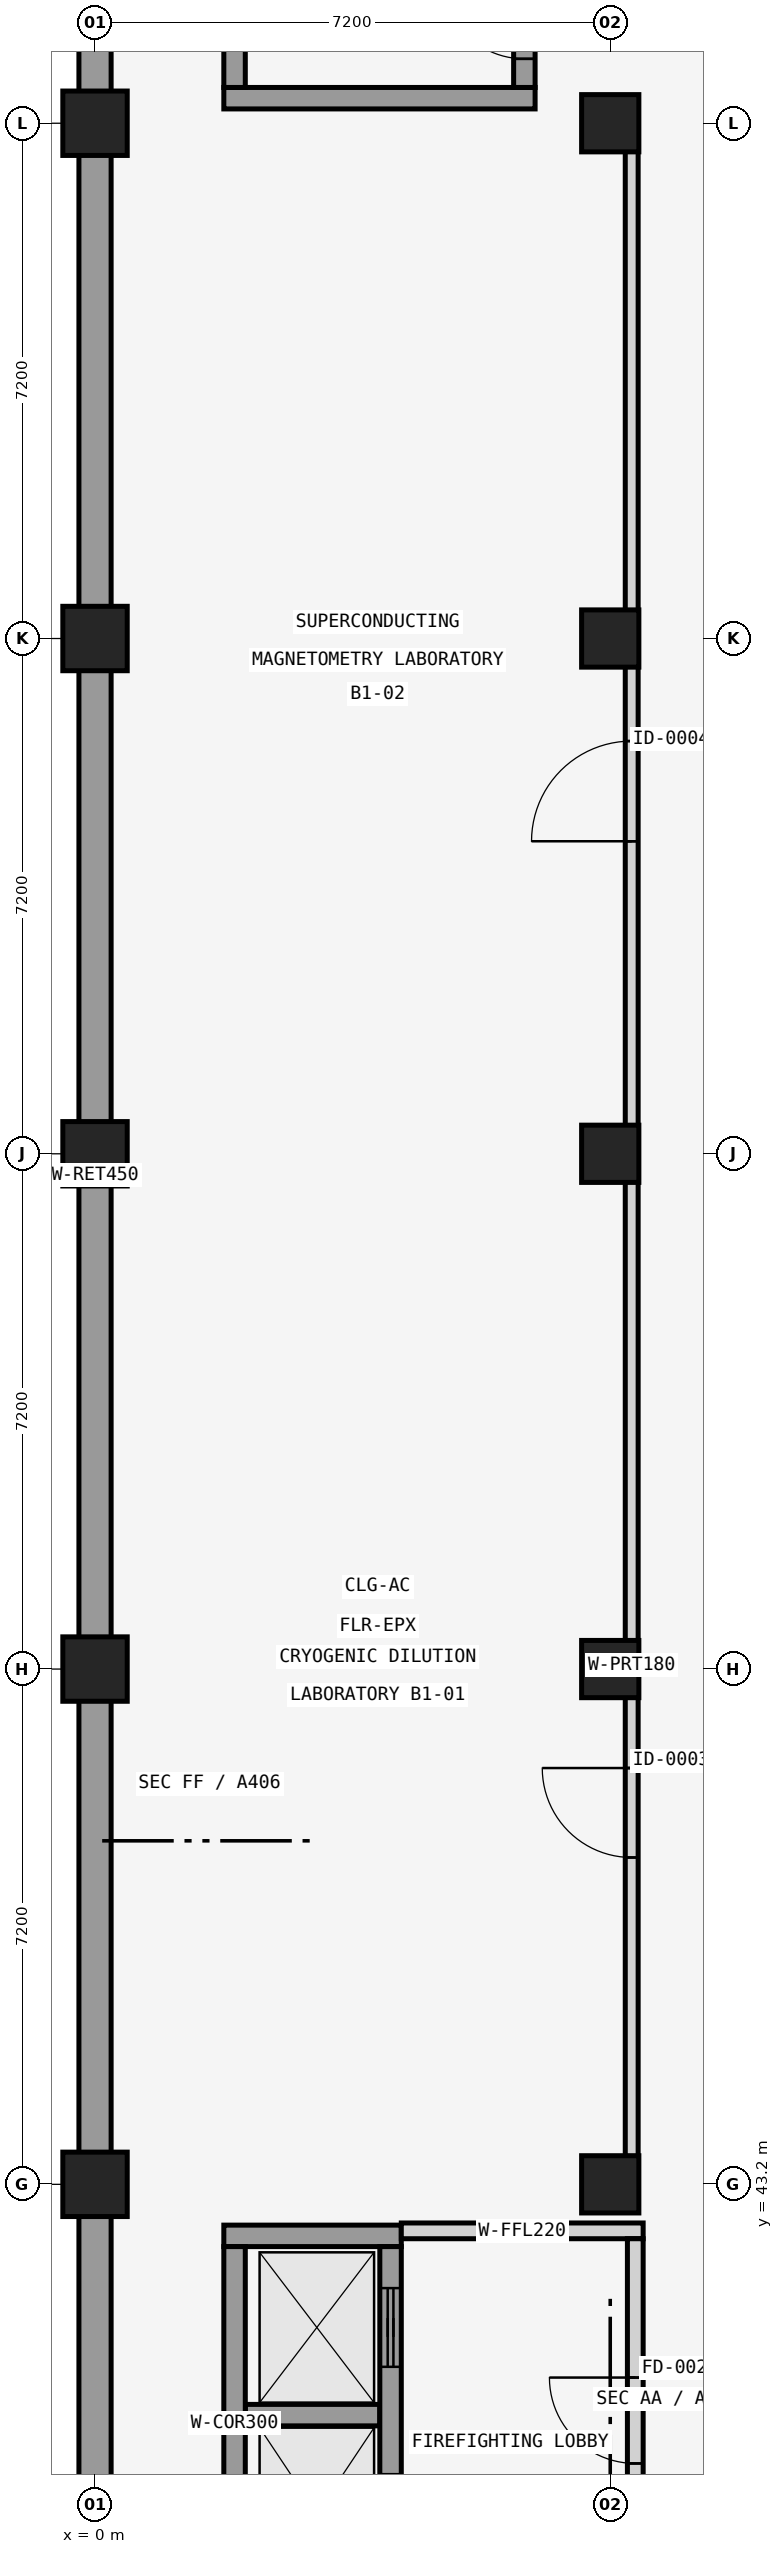
"""IFC4 building model, lengths in metres.
Left out: names, types, materials, properties, quantities, classifications, styles, units other than length and angle.
Written with IfcOpenShell. Run it as: python <this file> out.ifc"""

import sys

from ifc_helpers import new_model, si_unit, direction, frame, frame_2d, origin, origin_2d, place, context, subcontext, project, spatial, rectangle, extrude, element, fill, save


model = new_model("IFC4")
c1 = context("Model", 3, precision=1e-05, world=origin(), true_north=direction((0.0, 1.0)))
c2 = subcontext(c1, "Body", "Model", "MODEL_VIEW")
j1 = project(units=[si_unit("LENGTHUNIT", "METRE"), si_unit("PLANEANGLEUNIT", "RADIAN")], contexts=[c1])
p1 = place(None, origin())
s1 = spatial("IfcSite", under=j1, at=p1, CompositionType="ELEMENT")
p2 = place(p1, origin())
s2 = spatial("IfcBuilding", under=s1, at=p2, CompositionType="ELEMENT")
p3 = place(p2, frame((0.0, 0.0, -4.8)))
s3 = spatial("IfcBuildingStorey", under=s2, at=p3, CompositionType="ELEMENT", Elevation=-4.8)
for number, where, z_axis, x_axis in (
    (1, (0.0, 43.2, 0.0), (0.0, 0.0, 1.0), (1.0, 0.0, 0.0)),
    (2, (0.0, 50.4, 0.0), (0.0, 0.0, 1.0), (1.0, 0.0, 0.0)),
    (3, (0.0, 57.6, 0.0), (0.0, 0.0, 1.0), (1.0, 0.0, 0.0)),
    (4, (0.0, 64.8, 0.0), (0.0, 0.0, 1.0), (1.0, 0.0, 0.0)),
    (5, (0.0, 72.0, 0.0), (0.0, 0.0, 1.0), (1.0, 0.0, 0.0)),
):
    element("IfcColumn", number, at=place(p3, frame(where, z_axis=z_axis, x_axis=x_axis)), inside=s3, PredefinedType="COLUMN", context=c2, shape_type="SweptSolid", body=[
        extrude(rectangle(XDim=0.9, YDim=0.9, at=origin_2d()), origin(), (0.0, 0.0, 1.0), 4.8),
    ])
for number, where, z_axis, x_axis in (
    (6, (7.2, 43.2, 0.0), (0.0, 0.0, 1.0), (1.0, 0.0, 0.0)),
    (7, (7.2, 50.4, 0.0), (0.0, 0.0, 1.0), (1.0, 0.0, 0.0)),
    (8, (7.2, 57.6, 0.0), (0.0, 0.0, 1.0), (1.0, 0.0, 0.0)),
    (9, (7.2, 64.8, 0.0), (0.0, 0.0, 1.0), (1.0, 0.0, 0.0)),
    (10, (7.2, 72.0, 0.0), (0.0, 0.0, 1.0), (1.0, 0.0, 0.0)),
):
    element("IfcColumn", number, at=place(p3, frame(where, z_axis=z_axis, x_axis=x_axis)), inside=s3, PredefinedType="COLUMN", context=c2, shape_type="SweptSolid", body=[
        extrude(rectangle(XDim=0.8, YDim=0.8, at=origin_2d()), origin(), (0.0, 0.0, 1.0), 4.8),
    ])
p4 = place(p3, frame((0.0, 21.0, 0.0), z_axis=(0.0, 0.0, 1.0), x_axis=(0.0, 1.0, 0.0)))
e11 = element("IfcWall", 11, at=p4, inside=s3, PredefinedType="STANDARD", context=c2, shape_type="SweptSolid", body=[
    extrude(rectangle(XDim=72.6, YDim=0.45, at=frame_2d((36.3, 0.0))), origin(), (0.0, 0.0, 1.0), 4.4),
])
p5 = place(p3, frame((1.8, 42.48, 0.0), z_axis=(0.0, 0.0, 1.0), x_axis=(1.0, 0.0, 0.0)))
e12 = element("IfcWall", 12, at=p5, inside=s3, PredefinedType="SHEAR", context=c2, shape_type="SweptSolid", body=[
    extrude(rectangle(XDim=2.48, YDim=0.3, at=frame_2d((1.24, 0.0))), origin(), (0.0, 0.0, 1.0), 4.4),
])
p6 = place(p3, frame((2.1, 39.975, 0.0), z_axis=(0.0, 0.0, 1.0), x_axis=(1.0, 0.0, 0.0)))
e13 = element("IfcWall", 13, at=p6, inside=s3, PredefinedType="SHEAR", context=c2, shape_type="SweptSolid", body=[
    extrude(rectangle(XDim=1.88, YDim=0.3, at=frame_2d((0.94, 0.0))), origin(), (0.0, 0.0, 1.0), 4.4),
])
p7 = place(p3, frame((1.95, 37.4, 0.0), z_axis=(0.0, 0.0, 1.0), x_axis=(0.0, 1.0, 0.0)))
e14 = element("IfcWall", 14, at=p7, inside=s3, PredefinedType="SHEAR", context=c2, shape_type="SweptSolid", body=[
    extrude(rectangle(XDim=4.93, YDim=0.3, at=frame_2d((2.465, 0.0))), origin(), (0.0, 0.0, 1.0), 4.4),
])
p8 = place(p3, frame((4.13, 37.4, 0.0), z_axis=(0.0, 0.0, 1.0), x_axis=(0.0, 1.0, 0.0)))
e15 = element("IfcWall", 15, at=p8, inside=s3, PredefinedType="SHEAR", context=c2, shape_type="SweptSolid", body=[
    extrude(rectangle(XDim=4.93, YDim=0.3, at=frame_2d((2.465, 0.0))), origin(), (0.0, 0.0, 1.0), 4.4),
])
p9 = place(p8, frame((0.65, 0.0, 0.0)))
e16 = element("IfcOpeningElement", 16, at=p9, cuts=e15, PredefinedType="OPENING", context=c2, shape_type="SweptSolid", body=[
    extrude(rectangle(XDim=1.1, YDim=2.2, at=frame_2d((0.55, 1.1))), frame((0.0, 0.16, 0.0), z_axis=(0.0, -1.0, 0.0), x_axis=(1.0, 0.0, 0.0)), (0.0, 0.0, 1.0), 0.32),
])
p10 = place(p8, frame((3.25, 0.0, 0.0)))
e17 = element("IfcOpeningElement", 17, at=p10, cuts=e15, PredefinedType="OPENING", context=c2, shape_type="SweptSolid", body=[
    extrude(rectangle(XDim=1.1, YDim=2.2, at=frame_2d((0.55, 1.1))), frame((0.0, 0.16, 0.0), z_axis=(0.0, -1.0, 0.0), x_axis=(1.0, 0.0, 0.0)), (0.0, 0.0, 1.0), 0.32),
])
p11 = place(p3, frame((4.28, 42.55, 0.0), z_axis=(0.0, 0.0, 1.0), x_axis=(1.0, 0.0, 0.0)))
e18 = element("IfcWall", 18, at=p11, inside=s3, PredefinedType="SOLIDWALL", context=c2, shape_type="SweptSolid", body=[
    extrude(rectangle(XDim=3.38, YDim=0.22, at=frame_2d((1.69, 0.0))), origin(), (0.0, 0.0, 1.0), 4.4),
])
p12 = place(p3, frame((7.55, 37.36, 0.0), z_axis=(0.0, 0.0, 1.0), x_axis=(0.0, 1.0, 0.0)))
e19 = element("IfcWall", 19, at=p12, inside=s3, PredefinedType="SOLIDWALL", context=c2, shape_type="SweptSolid", body=[
    extrude(rectangle(XDim=5.08, YDim=0.22, at=frame_2d((2.54, 0.0))), origin(), (0.0, 0.0, 1.0), 4.4),
])
p13 = place(p12, frame((1.94, 0.0, 0.0)))
e20 = element("IfcOpeningElement", 20, at=p13, cuts=e19, PredefinedType="OPENING", context=c2, shape_type="SweptSolid", body=[
    extrude(rectangle(XDim=1.2, YDim=2.2, at=frame_2d((0.6, 1.1))), frame((0.0, 0.12, 0.0), z_axis=(0.0, -1.0, 0.0), x_axis=(1.0, 0.0, 0.0)), (0.0, 0.0, 1.0), 0.24),
])
p14 = place(p3, frame((1.8, 72.35, 0.0), z_axis=(0.0, 0.0, 1.0), x_axis=(1.0, 0.0, 0.0)))
e21 = element("IfcWall", 21, at=p14, inside=s3, PredefinedType="SHEAR", context=c2, shape_type="SweptSolid", body=[
    extrude(rectangle(XDim=4.35, YDim=0.3, at=frame_2d((2.175, 0.0))), origin(), (0.0, 0.0, 1.0), 4.4),
])
p15 = place(p3, frame((1.95, 72.5, 0.0), z_axis=(0.0, 0.0, 1.0), x_axis=(0.0, 1.0, 0.0)))
e22 = element("IfcWall", 22, at=p15, inside=s3, PredefinedType="SHEAR", context=c2, shape_type="SweptSolid", body=[
    extrude(rectangle(XDim=7.8, YDim=0.3, at=frame_2d((3.9, 0.0))), origin(), (0.0, 0.0, 1.0), 4.4),
])
p16 = place(p3, frame((6.0, 72.5, 0.0), z_axis=(0.0, 0.0, 1.0), x_axis=(0.0, 1.0, 0.0)))
e23 = element("IfcWall", 23, at=p16, inside=s3, PredefinedType="SHEAR", context=c2, shape_type="SweptSolid", body=[
    extrude(rectangle(XDim=7.8, YDim=0.3, at=frame_2d((3.9, 0.0))), origin(), (0.0, 0.0, 1.0), 4.4),
])
p17 = place(p16, frame((0.4, 0.0, 0.0)))
e24 = element("IfcOpeningElement", 24, at=p17, cuts=e23, PredefinedType="OPENING", context=c2, shape_type="SweptSolid", body=[
    extrude(rectangle(XDim=1.15, YDim=2.2, at=frame_2d((0.575, 1.1))), frame((0.0, 0.16, 0.0), z_axis=(0.0, -1.0, 0.0), x_axis=(1.0, 0.0, 0.0)), (0.0, 0.0, 1.0), 0.32),
])
p18 = place(p3, frame((7.5, 43.59, 0.0), z_axis=(0.0, 0.0, 1.0), x_axis=(0.0, 1.0, 0.0)))
e25 = element("IfcWall", 25, at=p18, inside=s3, PredefinedType="PARTITIONING", context=c2, shape_type="SweptSolid", body=[
    extrude(rectangle(XDim=13.72, YDim=0.18, at=frame_2d((6.86, 0.0))), origin(), (0.0, 0.0, 1.0), 3.7),
])
p19 = place(p18, frame((4.177, 0.0, 0.0)))
e26 = element("IfcOpeningElement", 26, at=p19, cuts=e25, PredefinedType="OPENING", context=c2, shape_type="SweptSolid", body=[
    extrude(rectangle(XDim=1.25, YDim=2.2, at=frame_2d((0.625, 1.1))), frame((0.0, 0.1, 0.0), z_axis=(0.0, -1.0, 0.0), x_axis=(1.0, 0.0, 0.0)), (0.0, 0.0, 1.0), 0.2),
])
p20 = place(p3, frame((7.5, 57.69, 0.0), z_axis=(0.0, 0.0, 1.0), x_axis=(0.0, 1.0, 0.0)))
e27 = element("IfcWall", 27, at=p20, inside=s3, PredefinedType="PARTITIONING", context=c2, shape_type="SweptSolid", body=[
    extrude(rectangle(XDim=14.22, YDim=0.18, at=frame_2d((7.11, 0.0))), origin(), (0.0, 0.0, 1.0), 3.7),
])
p21 = place(p20, frame((4.277, 0.0, 0.0)))
e28 = element("IfcOpeningElement", 28, at=p21, cuts=e27, PredefinedType="OPENING", context=c2, shape_type="SweptSolid", body=[
    extrude(rectangle(XDim=1.4, YDim=2.2, at=frame_2d((0.7, 1.1))), frame((0.0, 0.1, 0.0), z_axis=(0.0, -1.0, 0.0), x_axis=(1.0, 0.0, 0.0)), (0.0, 0.0, 1.0), 0.2),
])
p22 = place(p10, origin())
e29 = element("IfcDoor", 29, at=p22, inside=s3, OperationType="SLIDING_TO_LEFT", PredefinedType="DOOR", context=c2, shape_type="SweptSolid", body=[
    extrude(rectangle(XDim=1.1, YDim=2.2, at=frame_2d((0.55, 1.1))), frame((0.0, 0.025, 0.0), z_axis=(0.0, -1.0, 0.0), x_axis=(1.0, 0.0, 0.0)), (0.0, 0.0, 1.0), 0.05),
])
fill(e17, e29)
p23 = place(p13, origin())
e30 = element("IfcDoor", 30, at=p23, inside=s3, OperationType="SINGLE_SWING_RIGHT", PredefinedType="DOOR", context=c2, shape_type="SweptSolid", body=[
    extrude(rectangle(XDim=1.2, YDim=2.2, at=frame_2d((0.6, 1.1))), frame((0.0, 0.025, 0.0), z_axis=(0.0, -1.0, 0.0), x_axis=(1.0, 0.0, 0.0)), (0.0, 0.0, 1.0), 0.05),
])
fill(e20, e30)
p24 = place(p17, origin())
e31 = element("IfcDoor", 31, at=p24, inside=s3, OperationType="SINGLE_SWING_RIGHT", PredefinedType="DOOR", context=c2, shape_type="SweptSolid", body=[
    extrude(rectangle(XDim=1.15, YDim=2.2, at=frame_2d((0.575, 1.1))), frame((0.0, 0.025, 0.0), z_axis=(0.0, -1.0, 0.0), x_axis=(1.0, 0.0, 0.0)), (0.0, 0.0, 1.0), 0.05),
])
fill(e24, e31)
p25 = place(p19, origin())
e32 = element("IfcDoor", 32, at=p25, inside=s3, OperationType="SINGLE_SWING_RIGHT", PredefinedType="DOOR", context=c2, shape_type="SweptSolid", body=[
    extrude(rectangle(XDim=1.25, YDim=2.2, at=frame_2d((0.625, 1.1))), frame((0.0, 0.025, 0.0), z_axis=(0.0, -1.0, 0.0), x_axis=(1.0, 0.0, 0.0)), (0.0, 0.0, 1.0), 0.05),
])
fill(e26, e32)
p26 = place(p21, origin())
e33 = element("IfcDoor", 33, at=p26, inside=s3, OperationType="SINGLE_SWING_LEFT", PredefinedType="DOOR", context=c2, shape_type="SweptSolid", body=[
    extrude(rectangle(XDim=1.4, YDim=2.2, at=frame_2d((0.7, 1.1))), frame((0.0, 0.025, 0.0), z_axis=(0.0, -1.0, 0.0), x_axis=(1.0, 0.0, 0.0)), (0.0, 0.0, 1.0), 0.05),
])
fill(e28, e33)
save(model, sys.argv[1])
